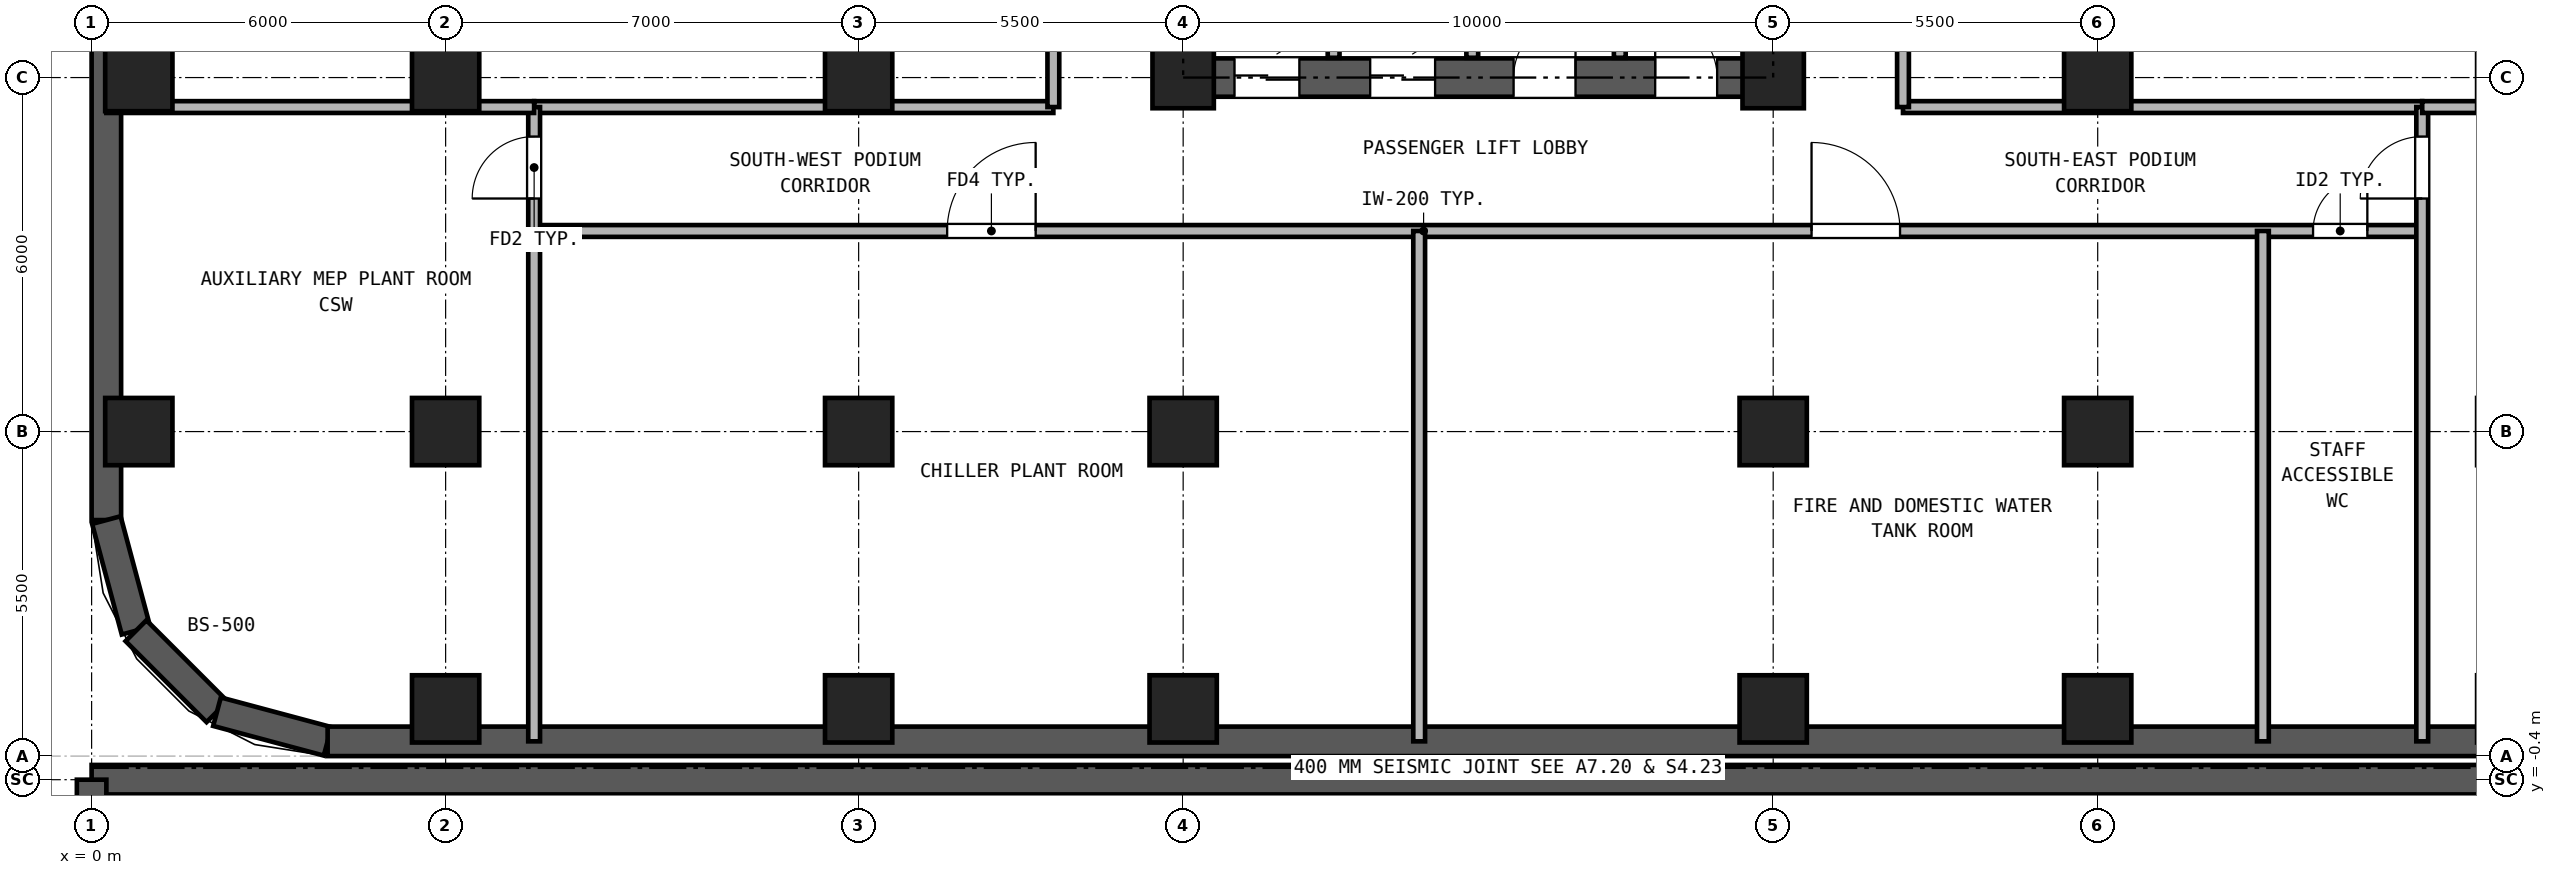
"""IFC4 building model, lengths in metres.
Left out: names, types, materials, properties, quantities, classifications, styles, units other than length and angle.
Written with IfcOpenShell. Run it as: python <this file> out.ifc"""

import sys

from ifc_helpers import new_model, si_unit, direction, frame, frame_2d, origin, origin_2d, place, context, subcontext, project, spatial, rectangle, hollow_rectangle, extrude, source, transform, mapped, element, fill, save


model = new_model("IFC4")
c1 = context("Model", 3, precision=1e-05, world=origin(), true_north=direction((0.0, 1.0)))
c2 = subcontext(c1, "Body", "Model", "MODEL_VIEW")
j1 = project(units=[si_unit("LENGTHUNIT", "METRE"), si_unit("PLANEANGLEUNIT", "RADIAN")], contexts=[c1])
p1 = place(None, origin())
s1 = spatial("IfcSite", under=j1, at=p1, CompositionType="ELEMENT")
p2 = place(p1, origin())
s2 = spatial("IfcBuilding", under=s1, at=p2, CompositionType="ELEMENT")
p3 = place(p2, frame((0.0, 0.0, -8.4)))
s3 = spatial("IfcBuildingStorey", under=s2, at=p3, CompositionType="ELEMENT", Elevation=-8.4)
m1 = source(origin(), c2, "Body", "SweptSolid", [
    extrude(hollow_rectangle(XDim=1.14, YDim=1.14, WallThickness=0.07, at=origin_2d()), origin(), (0.0, 0.0, 1.0), 3.88),
])
for number, where, z_axis, x_axis in (
    (1, (6.0, 0.8, 0.0), (0.0, 0.0, 1.0), (1.0, 0.0, 0.0)),
    (2, (13.0, 0.8, 0.0), (0.0, 0.0, 1.0), (1.0, 0.0, 0.0)),
    (3, (18.5, 0.8, 0.0), (0.0, 0.0, 1.0), (1.0, 0.0, 0.0)),
    (4, (28.5, 0.8, 0.0), (0.0, 0.0, 1.0), (1.0, 0.0, 0.0)),
    (5, (34.0, 0.8, 0.0), (0.0, 0.0, 1.0), (1.0, 0.0, 0.0)),
    (6, (0.8, 5.5, 0.0), (0.0, 0.0, 1.0), (1.0, 0.0, 0.0)),
    (7, (0.8, 11.5, 0.0), (0.0, 0.0, 1.0), (1.0, 0.0, 0.0)),
    (8, (6.0, 5.5, 0.0), (0.0, 0.0, 1.0), (1.0, 0.0, 0.0)),
    (9, (6.0, 11.5, 0.0), (0.0, 0.0, 1.0), (1.0, 0.0, 0.0)),
    (10, (13.0, 5.5, 0.0), (0.0, 0.0, 1.0), (1.0, 0.0, 0.0)),
    (11, (13.0, 11.5, 0.0), (0.0, 0.0, 1.0), (1.0, 0.0, 0.0)),
    (12, (18.5, 5.5, 0.0), (0.0, 0.0, 1.0), (1.0, 0.0, 0.0)),
):
    element("IfcColumn", number, at=place(p3, frame(where, z_axis=z_axis, x_axis=x_axis)), inside=s3, PredefinedType="COLUMN", context=c2, shape_type="MappedRepresentation", body=[
        mapped(m1, transform((0.0, 0.0, 0.0), x_axis=(1.0, 0.0, 0.0), y_axis=(0.0, 1.0, 0.0), z_axis=(0.0, 0.0, 1.0), scale=1.0)),
    ])
m2 = source(origin(), c2, "Body", "SweptSolid", [
    extrude(hollow_rectangle(XDim=1.04, YDim=1.04, WallThickness=0.065, at=origin_2d()), origin(), (0.0, 0.0, 1.0), 3.88),
])
p4 = place(p3, frame((18.5, 11.5, 0.0), z_axis=(0.0, 0.0, 1.0), x_axis=(1.0, 0.0, 0.0)))
e13 = element("IfcColumn", 13, at=p4, inside=s3, PredefinedType="COLUMN", context=c2, shape_type="MappedRepresentation", body=[
    mapped(m2, transform((0.0, 0.0, 0.0), x_axis=(1.0, 0.0, 0.0), y_axis=(0.0, 1.0, 0.0), z_axis=(0.0, 0.0, 1.0), scale=1.0)),
])
p5 = place(p3, frame((28.5, 5.5, 0.0), z_axis=(0.0, 0.0, 1.0), x_axis=(1.0, 0.0, 0.0)))
e14 = element("IfcColumn", 14, at=p5, inside=s3, PredefinedType="COLUMN", context=c2, shape_type="MappedRepresentation", body=[
    mapped(m1, transform((0.0, 0.0, 0.0), x_axis=(1.0, 0.0, 0.0), y_axis=(0.0, 1.0, 0.0), z_axis=(0.0, 0.0, 1.0), scale=1.0)),
])
p6 = place(p3, frame((28.5, 11.5, 0.0), z_axis=(0.0, 0.0, 1.0), x_axis=(1.0, 0.0, 0.0)))
e15 = element("IfcColumn", 15, at=p6, inside=s3, PredefinedType="COLUMN", context=c2, shape_type="MappedRepresentation", body=[
    mapped(m2, transform((0.0, 0.0, 0.0), x_axis=(1.0, 0.0, 0.0), y_axis=(0.0, 1.0, 0.0), z_axis=(0.0, 0.0, 1.0), scale=1.0)),
])
for number, where, z_axis, x_axis in (
    (16, (34.0, 5.5, 0.0), (0.0, 0.0, 1.0), (1.0, 0.0, 0.0)),
    (17, (34.0, 11.5, 0.0), (0.0, 0.0, 1.0), (1.0, 0.0, 0.0)),
):
    element("IfcColumn", number, at=place(p3, frame(where, z_axis=z_axis, x_axis=x_axis)), inside=s3, PredefinedType="COLUMN", context=c2, shape_type="MappedRepresentation", body=[
        mapped(m1, transform((0.0, 0.0, 0.0), x_axis=(1.0, 0.0, 0.0), y_axis=(0.0, 1.0, 0.0), z_axis=(0.0, 0.0, 1.0), scale=1.0)),
    ])
p7 = place(p3, frame((0.25, 36.5, 0.0), z_axis=(0.0, 0.0, 1.0), x_axis=(0.0, -1.0, 0.0)))
e18 = element("IfcWall", 18, at=p7, inside=s3, PredefinedType="USERDEFINED", context=c2, shape_type="SweptSolid", body=[
    extrude(rectangle(XDim=32.5, YDim=0.5, at=frame_2d((16.25, 0.0))), origin(), (0.0, 0.0, 1.0), 3.88),
])
for number, where, z_axis, x_axis in (
    (19, (0.25, 4.0, 0.0), (0.0, 0.0, 1.0), (0.259, -0.966, 0.0)),
    (20, (0.752, 2.125, 0.0), (0.0, 0.0, 1.0), (0.707, -0.707, 0.0)),
    (21, (2.125, 0.752, 0.0), (0.0, 0.0, 1.0), (0.966, -0.259, 0.0)),
):
    element("IfcWall", number, at=place(p3, frame(where, z_axis=z_axis, x_axis=x_axis)), inside=s3, PredefinedType="USERDEFINED", context=c2, shape_type="SweptSolid", body=[
        extrude(rectangle(XDim=1.941, YDim=0.5, at=frame_2d((0.971, 0.0))), origin(), (0.0, 0.0, 1.0), 3.88),
    ])
p8 = place(p3, frame((4.0, 0.25, 0.0), z_axis=(0.0, 0.0, 1.0), x_axis=(1.0, 0.0, 0.0)))
e22 = element("IfcWall", 22, at=p8, inside=s3, PredefinedType="USERDEFINED", context=c2, shape_type="SweptSolid", body=[
    extrude(rectangle(XDim=39.0, YDim=0.5, at=frame_2d((19.5, 0.0))), origin(), (0.0, 0.0, 1.0), 3.88),
])
p9 = place(p3, frame((47.4, -0.4, 0.0), z_axis=(0.0, 0.0, 1.0), x_axis=(-1.0, 0.0, 0.0)))
e23 = element("IfcWall", 23, at=p9, inside=s3, PredefinedType="USERDEFINED", context=c2, shape_type="SweptSolid", body=[
    extrude(rectangle(XDim=47.4, YDim=0.5, at=frame_2d((23.7, 0.0))), origin(), (0.0, 0.0, 1.0), 3.88),
])
p10 = place(p3, frame((0.0, -0.4, 0.0), z_axis=(0.0, 0.0, 1.0), x_axis=(0.0, -1.0, 0.0)))
e24 = element("IfcWall", 24, at=p10, inside=s3, PredefinedType="USERDEFINED", context=c2, shape_type="SweptSolid", body=[
    extrude(rectangle(XDim=10.7, YDim=0.5, at=frame_2d((5.35, 0.0))), origin(), (0.0, 0.0, 1.0), 3.88),
])
p11 = place(p3, frame((18.175, 11.5, 0.0), z_axis=(0.0, 0.0, 1.0), x_axis=(1.0, 0.0, 0.0)))
e25 = element("IfcWall", 25, at=p11, inside=s3, PredefinedType="SHEAR", context=c2, shape_type="SweptSolid", body=[
    extrude(rectangle(XDim=10.65, YDim=0.65, at=frame_2d((5.325, 0.0))), origin(), (0.0, 0.0, 1.0), 3.88),
])
p12 = place(p11, frame((1.195, 0.0, 0.0)))
e26 = element("IfcOpeningElement", 26, at=p12, cuts=e25, PredefinedType="OPENING", context=c2, shape_type="SweptSolid", body=[
    extrude(rectangle(XDim=1.1, YDim=2.25, at=frame_2d((0.55, 1.125))), frame((0.0, 0.335, 0.0), z_axis=(0.0, -1.0, 0.0), x_axis=(1.0, 0.0, 0.0)), (0.0, 0.0, 1.0), 0.67),
])
p13 = place(p11, frame((3.495, 0.0, 0.0)))
e27 = element("IfcOpeningElement", 27, at=p13, cuts=e25, PredefinedType="OPENING", context=c2, shape_type="SweptSolid", body=[
    extrude(rectangle(XDim=1.1, YDim=2.25, at=frame_2d((0.55, 1.125))), frame((0.0, 0.335, 0.0), z_axis=(0.0, -1.0, 0.0), x_axis=(1.0, 0.0, 0.0)), (0.0, 0.0, 1.0), 0.67),
])
p14 = place(p11, frame((5.925, 0.0, 0.0)))
e28 = element("IfcOpeningElement", 28, at=p14, cuts=e25, PredefinedType="OPENING", context=c2, shape_type="SweptSolid", body=[
    extrude(rectangle(XDim=1.05, YDim=2.15, at=frame_2d((0.525, 1.075))), frame((0.0, 0.335, 0.0), z_axis=(0.0, -1.0, 0.0), x_axis=(1.0, 0.0, 0.0)), (0.0, 0.0, 1.0), 0.67),
])
p15 = place(p11, frame((8.325, 0.0, 0.0)))
e29 = element("IfcOpeningElement", 29, at=p15, cuts=e25, PredefinedType="OPENING", context=c2, shape_type="SweptSolid", body=[
    extrude(rectangle(XDim=1.05, YDim=2.15, at=frame_2d((0.525, 1.075))), frame((0.0, 0.335, 0.0), z_axis=(0.0, -1.0, 0.0), x_axis=(1.0, 0.0, 0.0)), (0.0, 0.0, 1.0), 0.67),
])
p16 = place(p3, frame((18.5, 11.825, 0.0), z_axis=(0.0, 0.0, 1.0), x_axis=(0.0, 1.0, 0.0)))
e30 = element("IfcWall", 30, at=p16, inside=s3, PredefinedType="SHEAR", context=c2, shape_type="SweptSolid", body=[
    extrude(rectangle(XDim=16.6, YDim=0.65, at=frame_2d((8.3, 0.0))), origin(), (0.0, 0.0, 1.0), 3.88),
])
p17 = place(p16, frame((7.325, 0.0, 0.0)))
e31 = element("IfcOpeningElement", 31, at=p17, cuts=e30, PredefinedType="OPENING", context=c2, shape_type="SweptSolid", body=[
    extrude(rectangle(XDim=1.15, YDim=2.2, at=frame_2d((0.575, 1.1))), frame((0.0, 0.335, 0.0), z_axis=(0.0, -1.0, 0.0), x_axis=(1.0, 0.0, 0.0)), (0.0, 0.0, 1.0), 0.67),
])
p18 = place(p3, frame((28.5, 11.825, 0.0), z_axis=(0.0, 0.0, 1.0), x_axis=(0.0, 1.0, 0.0)))
e32 = element("IfcWall", 32, at=p18, inside=s3, PredefinedType="SHEAR", context=c2, shape_type="SweptSolid", body=[
    extrude(rectangle(XDim=16.6, YDim=0.65, at=frame_2d((8.3, 0.0))), origin(), (0.0, 0.0, 1.0), 3.88),
])
p19 = place(p18, frame((7.325, 0.0, 0.0)))
e33 = element("IfcOpeningElement", 33, at=p19, cuts=e32, PredefinedType="OPENING", context=c2, shape_type="SweptSolid", body=[
    extrude(rectangle(XDim=1.15, YDim=2.2, at=frame_2d((0.575, 1.1))), frame((0.0, 0.335, 0.0), z_axis=(0.0, -1.0, 0.0), x_axis=(1.0, 0.0, 0.0)), (0.0, 0.0, 1.0), 0.67),
])
for number, where, z_axis, x_axis in (
    (34, (21.05, 11.835, 0.0), (0.0, 0.0, 1.0), (0.0, 1.0, 0.0)),
    (35, (23.4, 11.835, 0.0), (0.0, 0.0, 1.0), (0.0, 1.0, 0.0)),
    (36, (25.9, 11.835, 0.0), (0.0, 0.0, 1.0), (0.0, 1.0, 0.0)),
):
    element("IfcWall", number, at=place(p3, frame(where, z_axis=z_axis, x_axis=x_axis)), inside=s3, PredefinedType="PARTITIONING", context=c2, shape_type="SweptSolid", body=[
        extrude(rectangle(XDim=3.165, YDim=0.2, at=frame_2d((1.583, 0.0))), origin(), (0.0, 0.0, 1.0), 3.88),
    ])
p20 = place(p3, frame((7.5, 8.9, 0.0), z_axis=(0.0, 0.0, 1.0), x_axis=(1.0, 0.0, 0.0)))
e37 = element("IfcWall", 37, at=p20, inside=s3, PredefinedType="PARTITIONING", context=c2, shape_type="SweptSolid", body=[
    extrude(rectangle(XDim=32.0, YDim=0.2, at=frame_2d((16.0, 0.0))), origin(), (0.0, 0.0, 1.0), 3.88),
])
p21 = place(p20, frame((7.0, 0.0, 0.0)))
e38 = element("IfcOpeningElement", 38, at=p21, cuts=e37, PredefinedType="OPENING", context=c2, shape_type="SweptSolid", body=[
    extrude(rectangle(XDim=1.5, YDim=2.25, at=frame_2d((0.75, 1.125))), frame((0.0, 0.11, 0.0), z_axis=(0.0, -1.0, 0.0), x_axis=(1.0, 0.0, 0.0)), (0.0, 0.0, 1.0), 0.22),
])
p22 = place(p20, frame((21.65, 0.0, 0.0)))
e39 = element("IfcOpeningElement", 39, at=p22, cuts=e37, PredefinedType="OPENING", context=c2, shape_type="SweptSolid", body=[
    extrude(rectangle(XDim=1.5, YDim=2.25, at=frame_2d((0.75, 1.125))), frame((0.0, 0.11, 0.0), z_axis=(0.0, -1.0, 0.0), x_axis=(1.0, 0.0, 0.0)), (0.0, 0.0, 1.0), 0.22),
])
p23 = place(p20, frame((30.15, 0.0, 0.0)))
e40 = element("IfcOpeningElement", 40, at=p23, cuts=e37, PredefinedType="OPENING", context=c2, shape_type="SweptSolid", body=[
    extrude(rectangle(XDim=0.92, YDim=2.1, at=frame_2d((0.46, 1.05))), frame((0.0, 0.11, 0.0), z_axis=(0.0, -1.0, 0.0), x_axis=(1.0, 0.0, 0.0)), (0.0, 0.0, 1.0), 0.22),
])
for number, where, z_axis, x_axis in (
    (41, (7.5, 11.0, 0.0), (0.0, 0.0, 1.0), (1.0, 0.0, 0.0)),
    (42, (30.7, 11.0, 0.0), (0.0, 0.0, 1.0), (1.0, 0.0, 0.0)),
):
    element("IfcWall", number, at=place(p3, frame(where, z_axis=z_axis, x_axis=x_axis)), inside=s3, PredefinedType="PARTITIONING", context=c2, shape_type="SweptSolid", body=[
        extrude(rectangle(XDim=8.8, YDim=0.2, at=frame_2d((4.4, 0.0))), origin(), (0.0, 0.0, 1.0), 3.88),
    ])
p24 = place(p3, frame((16.3, 11.0, 0.0), z_axis=(0.0, 0.0, 1.0), x_axis=(0.0, 1.0, 0.0)))
e43 = element("IfcWall", 43, at=p24, inside=s3, PredefinedType="PARTITIONING", context=c2, shape_type="SweptSolid", body=[
    extrude(rectangle(XDim=18.25, YDim=0.2, at=frame_2d((9.125, 0.0))), origin(), (0.0, 0.0, 1.0), 3.88),
])
p25 = place(p24, frame((4.25, 0.0, 0.0)))
e44 = element("IfcOpeningElement", 44, at=p25, cuts=e43, PredefinedType="OPENING", context=c2, shape_type="SweptSolid", body=[
    extrude(rectangle(XDim=0.95, YDim=2.15, at=frame_2d((0.475, 1.075))), frame((0.0, 0.11, 0.0), z_axis=(0.0, -1.0, 0.0), x_axis=(1.0, 0.0, 0.0)), (0.0, 0.0, 1.0), 0.22),
])
p26 = place(p24, frame((13.375, 0.0, 0.0)))
e45 = element("IfcOpeningElement", 45, at=p26, cuts=e43, PredefinedType="OPENING", context=c2, shape_type="SweptSolid", body=[
    extrude(rectangle(XDim=0.95, YDim=2.15, at=frame_2d((0.475, 1.075))), frame((0.0, 0.11, 0.0), z_axis=(0.0, -1.0, 0.0), x_axis=(1.0, 0.0, 0.0)), (0.0, 0.0, 1.0), 0.22),
])
p27 = place(p3, frame((30.7, 11.0, 0.0), z_axis=(0.0, 0.0, 1.0), x_axis=(0.0, 1.0, 0.0)))
e46 = element("IfcWall", 46, at=p27, inside=s3, PredefinedType="PARTITIONING", context=c2, shape_type="SweptSolid", body=[
    extrude(rectangle(XDim=18.25, YDim=0.2, at=frame_2d((9.125, 0.0))), origin(), (0.0, 0.0, 1.0), 3.88),
])
p28 = place(p27, frame((8.625, 0.0, 0.0)))
e47 = element("IfcOpeningElement", 47, at=p28, cuts=e46, PredefinedType="OPENING", context=c2, shape_type="SweptSolid", body=[
    extrude(rectangle(XDim=0.95, YDim=2.15, at=frame_2d((0.475, 1.075))), frame((0.0, 0.11, 0.0), z_axis=(0.0, -1.0, 0.0), x_axis=(1.0, 0.0, 0.0)), (0.0, 0.0, 1.0), 0.22),
])
p29 = place(p3, frame((7.5, 0.25, 0.0), z_axis=(0.0, 0.0, 1.0), x_axis=(0.0, 1.0, 0.0)))
e48 = element("IfcWall", 48, at=p29, inside=s3, PredefinedType="PARTITIONING", context=c2, shape_type="SweptSolid", body=[
    extrude(rectangle(XDim=10.75, YDim=0.2, at=frame_2d((5.375, 0.0))), origin(), (0.0, 0.0, 1.0), 3.88),
])
p30 = place(p29, frame((9.2, 0.0, 0.0)))
e49 = element("IfcOpeningElement", 49, at=p30, cuts=e48, PredefinedType="OPENING", context=c2, shape_type="SweptSolid", body=[
    extrude(rectangle(XDim=1.05, YDim=2.15, at=frame_2d((0.525, 1.075))), frame((0.0, 0.11, 0.0), z_axis=(0.0, -1.0, 0.0), x_axis=(1.0, 0.0, 0.0)), (0.0, 0.0, 1.0), 0.22),
])
p31 = place(p3, frame((39.5, 0.25, 0.0), z_axis=(0.0, 0.0, 1.0), x_axis=(0.0, 1.0, 0.0)))
e50 = element("IfcWall", 50, at=p31, inside=s3, PredefinedType="PARTITIONING", context=c2, shape_type="SweptSolid", body=[
    extrude(rectangle(XDim=10.75, YDim=0.2, at=frame_2d((5.375, 0.0))), origin(), (0.0, 0.0, 1.0), 3.88),
])
p32 = place(p31, frame((9.2, 0.0, 0.0)))
e51 = element("IfcOpeningElement", 51, at=p32, cuts=e50, PredefinedType="OPENING", context=c2, shape_type="SweptSolid", body=[
    extrude(rectangle(XDim=1.05, YDim=2.15, at=frame_2d((0.525, 1.075))), frame((0.0, 0.11, 0.0), z_axis=(0.0, -1.0, 0.0), x_axis=(1.0, 0.0, 0.0)), (0.0, 0.0, 1.0), 0.22),
])
for number, where, z_axis, x_axis in (
    (52, (0.25, 11.0, 0.0), (0.0, 0.0, 1.0), (1.0, 0.0, 0.0)),
    (53, (39.5, 11.0, 0.0), (0.0, 0.0, 1.0), (1.0, 0.0, 0.0)),
):
    element("IfcWall", number, at=place(p3, frame(where, z_axis=z_axis, x_axis=x_axis)), inside=s3, PredefinedType="PARTITIONING", context=c2, shape_type="SweptSolid", body=[
        extrude(rectangle(XDim=7.25, YDim=0.2, at=frame_2d((3.625, 0.0))), origin(), (0.0, 0.0, 1.0), 3.88),
    ])
for number, where, z_axis, x_axis in (
    (54, (22.5, 0.25, 0.0), (0.0, 0.0, 1.0), (0.0, 1.0, 0.0)),
    (55, (36.8, 0.25, 0.0), (0.0, 0.0, 1.0), (0.0, 1.0, 0.0)),
):
    element("IfcWall", number, at=place(p3, frame(where, z_axis=z_axis, x_axis=x_axis)), inside=s3, PredefinedType="PARTITIONING", context=c2, shape_type="SweptSolid", body=[
        extrude(rectangle(XDim=8.65, YDim=0.2, at=frame_2d((4.325, 0.0))), origin(), (0.0, 0.0, 1.0), 3.88),
    ])
p33 = place(p12, frame((1.1, 0.0, 0.0), z_axis=(0.0, 0.0, 1.0), x_axis=(-1.0, 0.0, 0.0)))
e56 = element("IfcDoor", 56, at=p33, inside=s3, OperationType="DOUBLE_DOOR_SLIDING", PredefinedType="DOOR", context=c2, shape_type="SweptSolid", body=[
    extrude(rectangle(XDim=1.1, YDim=2.25, at=frame_2d((0.55, 1.125))), frame((0.0, 0.025, 0.0), z_axis=(0.0, -1.0, 0.0), x_axis=(1.0, 0.0, 0.0)), (0.0, 0.0, 1.0), 0.05),
])
fill(e26, e56)
p34 = place(p13, frame((1.1, 0.0, 0.0), z_axis=(0.0, 0.0, 1.0), x_axis=(-1.0, 0.0, 0.0)))
e57 = element("IfcDoor", 57, at=p34, inside=s3, OperationType="DOUBLE_DOOR_SLIDING", PredefinedType="DOOR", context=c2, shape_type="SweptSolid", body=[
    extrude(rectangle(XDim=1.1, YDim=2.25, at=frame_2d((0.55, 1.125))), frame((0.0, 0.025, 0.0), z_axis=(0.0, -1.0, 0.0), x_axis=(1.0, 0.0, 0.0)), (0.0, 0.0, 1.0), 0.05),
])
fill(e27, e57)
p35 = place(p14, frame((1.05, 0.0, 0.0), z_axis=(0.0, 0.0, 1.0), x_axis=(-1.0, 0.0, 0.0)))
e58 = element("IfcDoor", 58, at=p35, inside=s3, OperationType="SINGLE_SWING_RIGHT", PredefinedType="DOOR", context=c2, shape_type="SweptSolid", body=[
    extrude(rectangle(XDim=1.05, YDim=2.15, at=frame_2d((0.525, 1.075))), frame((0.0, 0.025, 0.0), z_axis=(0.0, -1.0, 0.0), x_axis=(1.0, 0.0, 0.0)), (0.0, 0.0, 1.0), 0.05),
])
fill(e28, e58)
p36 = place(p15, frame((1.05, 0.0, 0.0), z_axis=(0.0, 0.0, 1.0), x_axis=(-1.0, 0.0, 0.0)))
e59 = element("IfcDoor", 59, at=p36, inside=s3, OperationType="SINGLE_SWING_LEFT", PredefinedType="DOOR", context=c2, shape_type="SweptSolid", body=[
    extrude(rectangle(XDim=1.05, YDim=2.15, at=frame_2d((0.525, 1.075))), frame((0.0, 0.025, 0.0), z_axis=(0.0, -1.0, 0.0), x_axis=(1.0, 0.0, 0.0)), (0.0, 0.0, 1.0), 0.05),
])
fill(e29, e59)
p37 = place(p21, frame((1.5, 0.0, 0.0), z_axis=(0.0, 0.0, 1.0), x_axis=(-1.0, 0.0, 0.0)))
e60 = element("IfcDoor", 60, at=p37, inside=s3, OperationType="SINGLE_SWING_RIGHT", PredefinedType="DOOR", context=c2, shape_type="SweptSolid", body=[
    extrude(rectangle(XDim=1.5, YDim=2.25, at=frame_2d((0.75, 1.125))), frame((0.0, 0.025, 0.0), z_axis=(0.0, -1.0, 0.0), x_axis=(1.0, 0.0, 0.0)), (0.0, 0.0, 1.0), 0.05),
])
fill(e38, e60)
p38 = place(p22, frame((1.5, 0.0, 0.0), z_axis=(0.0, 0.0, 1.0), x_axis=(-1.0, 0.0, 0.0)))
e61 = element("IfcDoor", 61, at=p38, inside=s3, OperationType="SINGLE_SWING_LEFT", PredefinedType="DOOR", context=c2, shape_type="SweptSolid", body=[
    extrude(rectangle(XDim=1.5, YDim=2.25, at=frame_2d((0.75, 1.125))), frame((0.0, 0.025, 0.0), z_axis=(0.0, -1.0, 0.0), x_axis=(1.0, 0.0, 0.0)), (0.0, 0.0, 1.0), 0.05),
])
fill(e39, e61)
p39 = place(p23, frame((0.92, 0.0, 0.0), z_axis=(0.0, 0.0, 1.0), x_axis=(-1.0, 0.0, 0.0)))
e62 = element("IfcDoor", 62, at=p39, inside=s3, OperationType="SINGLE_SWING_RIGHT", PredefinedType="DOOR", context=c2, shape_type="SweptSolid", body=[
    extrude(rectangle(XDim=0.92, YDim=2.1, at=frame_2d((0.46, 1.05))), frame((0.0, 0.025, 0.0), z_axis=(0.0, -1.0, 0.0), x_axis=(1.0, 0.0, 0.0)), (0.0, 0.0, 1.0), 0.05),
])
fill(e40, e62)
p40 = place(p30, frame((1.05, 0.0, 0.0), z_axis=(0.0, 0.0, 1.0), x_axis=(-1.0, 0.0, 0.0)))
e63 = element("IfcDoor", 63, at=p40, inside=s3, OperationType="SINGLE_SWING_LEFT", PredefinedType="DOOR", context=c2, shape_type="SweptSolid", body=[
    extrude(rectangle(XDim=1.05, YDim=2.15, at=frame_2d((0.525, 1.075))), frame((0.0, 0.025, 0.0), z_axis=(0.0, -1.0, 0.0), x_axis=(1.0, 0.0, 0.0)), (0.0, 0.0, 1.0), 0.05),
])
fill(e49, e63)
p41 = place(p32, origin())
e64 = element("IfcDoor", 64, at=p41, inside=s3, OperationType="SINGLE_SWING_LEFT", PredefinedType="DOOR", context=c2, shape_type="SweptSolid", body=[
    extrude(rectangle(XDim=1.05, YDim=2.15, at=frame_2d((0.525, 1.075))), frame((0.0, 0.025, 0.0), z_axis=(0.0, -1.0, 0.0), x_axis=(1.0, 0.0, 0.0)), (0.0, 0.0, 1.0), 0.05),
])
fill(e51, e64)
save(model, sys.argv[1])
